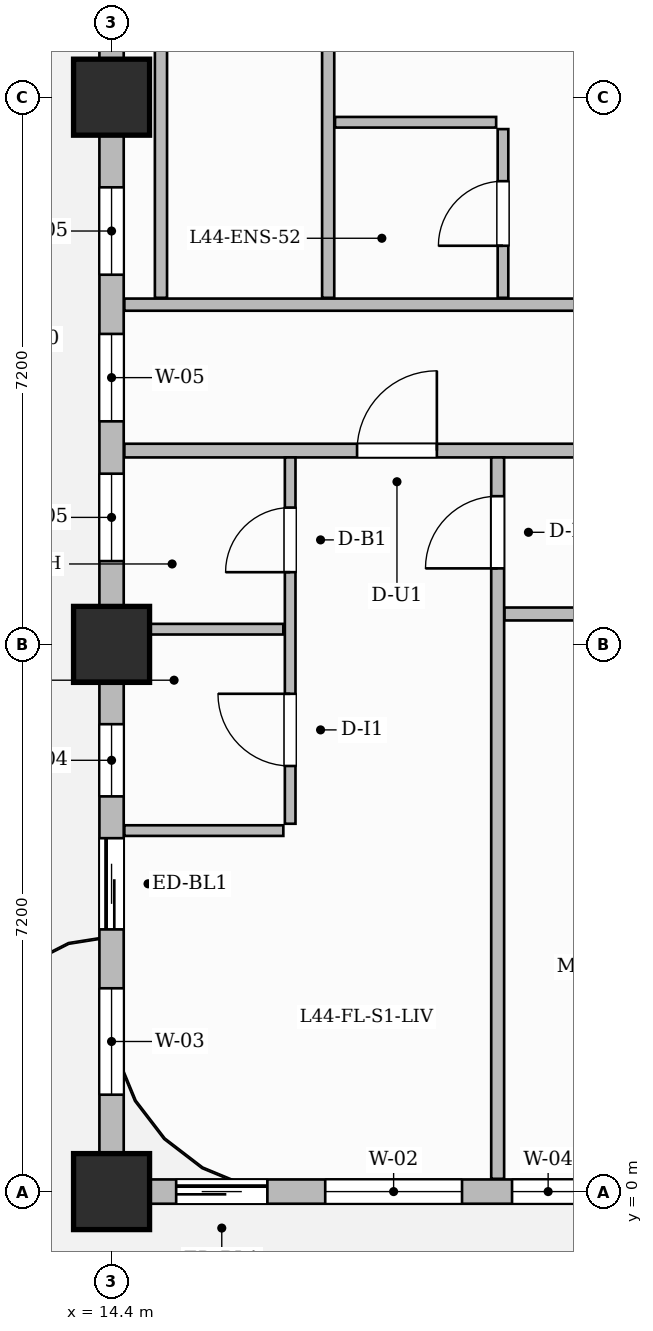
"""IFC4 building model, lengths in metres.
Left out: names, types, materials, properties, quantities, classifications, styles, units other than length and angle.
Written with IfcOpenShell. Run it as: python <this file> out.ifc"""

import sys

from ifc_helpers import new_model, si_unit, direction, frame, frame_2d, origin, origin_2d, place, context, subcontext, project, spatial, rectangle, extrude, source, transform, mapped, element, fill, save


model = new_model("IFC4")
c1 = context("Model", 3, precision=1e-05, world=origin(), true_north=direction((0.0, 1.0)))
c2 = subcontext(c1, "Body", "Model", "MODEL_VIEW")
j1 = project(units=[si_unit("LENGTHUNIT", "METRE"), si_unit("PLANEANGLEUNIT", "RADIAN")], contexts=[c1])
p1 = place(None, origin())
s1 = spatial("IfcSite", under=j1, at=p1, CompositionType="ELEMENT")
p2 = place(p1, origin())
s2 = spatial("IfcBuilding", under=s1, at=p2, CompositionType="ELEMENT")
p3 = place(p2, frame((0.0, 0.0, 177.25)))
s3 = spatial("IfcBuildingStorey", under=s2, at=p3, CompositionType="ELEMENT", Elevation=177.25)
m1 = source(origin(), c2, "Body", "SweptSolid", [
    extrude(rectangle(XDim=1.0, YDim=1.0, at=origin_2d()), origin(), (0.0, 0.0, 1.0), 3.85),
])
for number, where, z_axis, x_axis in (
    (1, (14.4, 0.0, 0.0), (0.0, 0.0, 1.0), (1.0, 0.0, 0.0)),
    (2, (14.4, 7.2, 0.0), (0.0, 0.0, 1.0), (1.0, 0.0, 0.0)),
    (3, (14.4, 14.4, 0.0), (0.0, 0.0, 1.0), (1.0, 0.0, 0.0)),
):
    element("IfcColumn", number, at=place(p3, frame(where, z_axis=z_axis, x_axis=x_axis)), inside=s3, PredefinedType="COLUMN", context=c2, shape_type="MappedRepresentation", body=[
        mapped(m1, transform((0.0, 0.0, 0.0), scale=1.0)),
    ])
p4 = place(p3, frame((14.568, 9.75, 0.0), z_axis=(0.0, 0.0, 1.0), x_axis=(1.0, 0.0, 0.0)))
e4 = element("IfcWall", 4, at=p4, inside=s3, PredefinedType="PARTITIONING", context=c2, shape_type="SweptSolid", body=[
    extrude(rectangle(XDim=15.542, YDim=0.18, at=frame_2d((7.771, 0.0))), origin(), (0.0, 0.0, 1.0), 3.6),
])
p5 = place(p4, frame((3.062, 0.0, 0.0)))
e5 = element("IfcOpeningElement", 5, at=p5, cuts=e4, PredefinedType="OPENING", context=c2, shape_type="SweptSolid", body=[
    extrude(rectangle(XDim=1.05, YDim=2.25, at=frame_2d((0.525, 1.125))), frame((0.0, 0.1, 0.0), z_axis=(0.0, -1.0, 0.0), x_axis=(1.0, 0.0, 0.0)), (0.0, 0.0, 1.0), 0.2),
])
p6 = place(p3, frame((14.568, 11.67, 0.0), z_axis=(0.0, 0.0, 1.0), x_axis=(1.0, 0.0, 0.0)))
e6 = element("IfcWall", 6, at=p6, inside=s3, PredefinedType="PARTITIONING", context=c2, shape_type="SweptSolid", body=[
    extrude(rectangle(XDim=15.542, YDim=0.16, at=frame_2d((7.771, 0.0))), origin(), (0.0, 0.0, 1.0), 3.6),
])
p7 = place(p6, frame((6.682, 0.0, 0.0)))
e7 = element("IfcOpeningElement", 7, at=p7, cuts=e6, PredefinedType="OPENING", context=c2, shape_type="SweptSolid", body=[
    extrude(rectangle(XDim=1.05, YDim=2.25, at=frame_2d((0.525, 1.125))), frame((0.0, 0.09, 0.0), z_axis=(0.0, -1.0, 0.0), x_axis=(1.0, 0.0, 0.0)), (0.0, 0.0, 1.0), 0.18),
])
p8 = place(p6, frame((11.832, 0.0, 0.0)))
e8 = element("IfcOpeningElement", 8, at=p8, cuts=e6, PredefinedType="OPENING", context=c2, shape_type="SweptSolid", body=[
    extrude(rectangle(XDim=1.4, YDim=2.35, at=frame_2d((0.7, 1.175))), frame((0.0, 0.09, 0.0), z_axis=(0.0, -1.0, 0.0), x_axis=(1.0, 0.0, 0.0)), (0.0, 0.0, 1.0), 0.18),
])
p9 = place(p3, frame((16.75, 4.84, 0.0), z_axis=(0.0, 0.0, 1.0), x_axis=(0.0, 1.0, 0.0)))
e9 = element("IfcWall", 9, at=p9, inside=s3, PredefinedType="PARTITIONING", context=c2, shape_type="SweptSolid", body=[
    extrude(rectangle(XDim=4.82, YDim=0.14, at=frame_2d((2.41, 0.0))), origin(), (0.0, 0.0, 1.0), 3.6),
])
p10 = place(p9, frame((0.76, 0.0, 0.0)))
e10 = element("IfcOpeningElement", 10, at=p10, cuts=e9, PredefinedType="OPENING", context=c2, shape_type="SweptSolid", body=[
    extrude(rectangle(XDim=0.95, YDim=2.15, at=frame_2d((0.475, 1.075))), frame((0.0, 0.08, 0.0), z_axis=(0.0, -1.0, 0.0), x_axis=(1.0, 0.0, 0.0)), (0.0, 0.0, 1.0), 0.16),
])
p11 = place(p9, frame((3.31, 0.0, 0.0)))
e11 = element("IfcOpeningElement", 11, at=p11, cuts=e9, PredefinedType="OPENING", context=c2, shape_type="SweptSolid", body=[
    extrude(rectangle(XDim=0.85, YDim=2.1, at=frame_2d((0.425, 1.05))), frame((0.0, 0.08, 0.0), z_axis=(0.0, -1.0, 0.0), x_axis=(1.0, 0.0, 0.0)), (0.0, 0.0, 1.0), 0.16),
])
p12 = place(p3, frame((14.59, 7.4, 0.0), z_axis=(0.0, 0.0, 1.0), x_axis=(1.0, 0.0, 0.0)))
e12 = element("IfcWall", 12, at=p12, inside=s3, PredefinedType="PARTITIONING", context=c2, shape_type="SweptSolid", body=[
    extrude(rectangle(XDim=2.07, YDim=0.14, at=frame_2d((1.035, 0.0))), origin(), (0.0, 0.0, 1.0), 3.085),
])
p13 = place(p3, frame((14.568, 4.75, 0.0), z_axis=(0.0, 0.0, 1.0), x_axis=(1.0, 0.0, 0.0)))
e13 = element("IfcWall", 13, at=p13, inside=s3, PredefinedType="PARTITIONING", context=c2, shape_type="SweptSolid", body=[
    extrude(rectangle(XDim=2.092, YDim=0.14, at=frame_2d((1.046, 0.0))), origin(), (0.0, 0.0, 1.0), 3.6),
])
p14 = place(p3, frame((19.48, 0.168, 0.0), z_axis=(0.0, 0.0, 1.0), x_axis=(0.0, 1.0, 0.0)))
e14 = element("IfcWall", 14, at=p14, inside=s3, PredefinedType="PARTITIONING", context=c2, shape_type="SweptSolid", body=[
    extrude(rectangle(XDim=9.492, YDim=0.17, at=frame_2d((4.746, 0.0))), origin(), (0.0, 0.0, 1.0), 3.6),
])
p15 = place(p14, frame((8.032, 0.0, 0.0)))
e15 = element("IfcOpeningElement", 15, at=p15, cuts=e14, PredefinedType="OPENING", context=c2, shape_type="SweptSolid", body=[
    extrude(rectangle(XDim=0.95, YDim=2.15, at=frame_2d((0.475, 1.075))), frame((0.0, 0.095, 0.0), z_axis=(0.0, -1.0, 0.0), x_axis=(1.0, 0.0, 0.0)), (0.0, 0.0, 1.0), 0.19),
])
p16 = place(p3, frame((19.57, 7.6, 0.0), z_axis=(0.0, 0.0, 1.0), x_axis=(1.0, 0.0, 0.0)))
e16 = element("IfcWall", 16, at=p16, inside=s3, PredefinedType="PARTITIONING", context=c2, shape_type="SweptSolid", body=[
    extrude(rectangle(XDim=10.54, YDim=0.17, at=frame_2d((5.27, 0.0))), origin(), (0.0, 0.0, 1.0), 3.6),
])
p17 = place(p16, frame((2.784, 0.0, 0.0)))
e17 = element("IfcOpeningElement", 17, at=p17, cuts=e16, PredefinedType="OPENING", context=c2, shape_type="SweptSolid", body=[
    extrude(rectangle(XDim=0.95, YDim=2.15, at=frame_2d((0.475, 1.075))), frame((0.0, 0.095, 0.0), z_axis=(0.0, -1.0, 0.0), x_axis=(1.0, 0.0, 0.0)), (0.0, 0.0, 1.0), 0.19),
])
p18 = place(p16, frame((4.865, 0.0, 0.0)))
e18 = element("IfcOpeningElement", 18, at=p18, cuts=e16, PredefinedType="OPENING", context=c2, shape_type="SweptSolid", body=[
    extrude(rectangle(XDim=0.95, YDim=2.15, at=frame_2d((0.475, 1.075))), frame((0.0, 0.095, 0.0), z_axis=(0.0, -1.0, 0.0), x_axis=(1.0, 0.0, 0.0)), (0.0, 0.0, 1.0), 0.19),
])
p19 = place(p16, frame((7.055, 0.0, 0.0)))
e19 = element("IfcOpeningElement", 19, at=p19, cuts=e16, PredefinedType="OPENING", context=c2, shape_type="SweptSolid", body=[
    extrude(rectangle(XDim=0.95, YDim=2.15, at=frame_2d((0.475, 1.075))), frame((0.0, 0.095, 0.0), z_axis=(0.0, -1.0, 0.0), x_axis=(1.0, 0.0, 0.0)), (0.0, 0.0, 1.0), 0.19),
])
for number, where, z_axis, x_axis in (
    (20, (15.05, 11.76, 0.0), (0.0, 0.0, 1.0), (0.0, 1.0, 0.0)),
    (21, (17.25, 11.76, 0.0), (0.0, 0.0, 1.0), (0.0, 1.0, 0.0)),
):
    element("IfcWall", number, at=place(p3, frame(where, z_axis=z_axis, x_axis=x_axis)), inside=s3, PredefinedType="PARTITIONING", context=c2, shape_type="SweptSolid", body=[
        extrude(rectangle(XDim=13.35, YDim=0.16, at=frame_2d((6.675, 0.0))), origin(), (0.0, 0.0, 1.0), 3.6),
    ])
p20 = place(p3, frame((19.55, 11.76, 0.0), z_axis=(0.0, 0.0, 1.0), x_axis=(0.0, 1.0, 0.0)))
e22 = element("IfcWall", 22, at=p20, inside=s3, PredefinedType="PARTITIONING", context=c2, shape_type="SweptSolid", body=[
    extrude(rectangle(XDim=2.22, YDim=0.14, at=frame_2d((1.11, 0.0))), origin(), (0.0, 0.0, 1.0), 3.6),
])
p21 = place(p20, frame((0.685, 0.0, 0.0)))
e23 = element("IfcOpeningElement", 23, at=p21, cuts=e22, PredefinedType="OPENING", context=c2, shape_type="SweptSolid", body=[
    extrude(rectangle(XDim=0.85, YDim=2.1, at=frame_2d((0.425, 1.05))), frame((0.0, 0.08, 0.0), z_axis=(0.0, -1.0, 0.0), x_axis=(1.0, 0.0, 0.0)), (0.0, 0.0, 1.0), 0.16),
])
p22 = place(p3, frame((17.34, 14.07, 0.0), z_axis=(0.0, 0.0, 1.0), x_axis=(1.0, 0.0, 0.0)))
e24 = element("IfcWall", 24, at=p22, inside=s3, PredefinedType="PARTITIONING", context=c2, shape_type="SweptSolid", body=[
    extrude(rectangle(XDim=2.12, YDim=0.14, at=frame_2d((1.06, 0.0))), origin(), (0.0, 0.0, 1.0), 3.6),
])
p23 = place(p3, frame((14.4, 0.0, 0.0), z_axis=(0.0, 0.0, 1.0), x_axis=(1.0, 0.0, 0.0)))
e25 = element("IfcWall", 25, at=p23, inside=s3, PredefinedType="SOLIDWALL", context=c2, shape_type="SweptSolid", body=[
    extrude(rectangle(XDim=35.4, YDim=0.32, at=frame_2d((17.7, 0.0))), origin(), (0.0, 0.0, 1.0), 3.085),
])
p24 = place(p23, frame((0.85, 0.0, 0.0)))
e26 = element("IfcOpeningElement", 26, at=p24, cuts=e25, PredefinedType="OPENING", context=c2, shape_type="SweptSolid", body=[
    extrude(rectangle(XDim=1.2, YDim=2.2, at=frame_2d((0.6, 1.1))), frame((0.0, 0.17, 0.0), z_axis=(0.0, -1.0, 0.0), x_axis=(1.0, 0.0, 0.0)), (0.0, 0.0, 1.0), 0.34),
])
p25 = place(p23, frame((2.811, 0.0, 0.8)))
e27 = element("IfcOpeningElement", 27, at=p25, cuts=e25, PredefinedType="OPENING", context=c2, shape_type="SweptSolid", body=[
    extrude(rectangle(XDim=1.8, YDim=1.85, at=frame_2d((0.9, 0.925))), frame((0.0, 0.17, 0.0), z_axis=(0.0, -1.0, 0.0), x_axis=(1.0, 0.0, 0.0)), (0.0, 0.0, 1.0), 0.34),
])
p26 = place(p23, frame((5.269, 0.0, 0.8)))
e28 = element("IfcOpeningElement", 28, at=p26, cuts=e25, PredefinedType="OPENING", context=c2, shape_type="SweptSolid", body=[
    extrude(rectangle(XDim=0.95, YDim=1.75, at=frame_2d((0.475, 0.875))), frame((0.0, 0.17, 0.0), z_axis=(0.0, -1.0, 0.0), x_axis=(1.0, 0.0, 0.0)), (0.0, 0.0, 1.0), 0.34),
])
p27 = place(p23, frame((8.181, 0.0, 0.8)))
e29 = element("IfcOpeningElement", 29, at=p27, cuts=e25, PredefinedType="OPENING", context=c2, shape_type="SweptSolid", body=[
    extrude(rectangle(XDim=0.95, YDim=1.75, at=frame_2d((0.475, 0.875))), frame((0.0, 0.17, 0.0), z_axis=(0.0, -1.0, 0.0), x_axis=(1.0, 0.0, 0.0)), (0.0, 0.0, 1.0), 0.34),
])
p28 = place(p23, frame((9.81, 0.0, 0.8)))
e30 = element("IfcOpeningElement", 30, at=p28, cuts=e25, PredefinedType="OPENING", context=c2, shape_type="SweptSolid", body=[
    extrude(rectangle(XDim=1.4, YDim=1.85, at=frame_2d((0.7, 0.925))), frame((0.0, 0.17, 0.0), z_axis=(0.0, -1.0, 0.0), x_axis=(1.0, 0.0, 0.0)), (0.0, 0.0, 1.0), 0.34),
])
p29 = place(p23, frame((12.079, 0.0, 0.8)))
e31 = element("IfcOpeningElement", 31, at=p29, cuts=e25, PredefinedType="OPENING", context=c2, shape_type="SweptSolid", body=[
    extrude(rectangle(XDim=1.15, YDim=1.8, at=frame_2d((0.575, 0.9))), frame((0.0, 0.17, 0.0), z_axis=(0.0, -1.0, 0.0), x_axis=(1.0, 0.0, 0.0)), (0.0, 0.0, 1.0), 0.34),
])
p30 = place(p23, frame((16.804, 0.0, 0.8)))
e32 = element("IfcOpeningElement", 32, at=p30, cuts=e25, PredefinedType="OPENING", context=c2, shape_type="SweptSolid", body=[
    extrude(rectangle(XDim=1.8, YDim=1.85, at=frame_2d((0.9, 0.925))), frame((0.0, 0.17, 0.0), z_axis=(0.0, -1.0, 0.0), x_axis=(1.0, 0.0, 0.0)), (0.0, 0.0, 1.0), 0.34),
])
p31 = place(p23, frame((21.725, 0.0, 0.8)))
e33 = element("IfcOpeningElement", 33, at=p31, cuts=e25, PredefinedType="OPENING", context=c2, shape_type="SweptSolid", body=[
    extrude(rectangle(XDim=1.8, YDim=1.85, at=frame_2d((0.9, 0.925))), frame((0.0, 0.17, 0.0), z_axis=(0.0, -1.0, 0.0), x_axis=(1.0, 0.0, 0.0)), (0.0, 0.0, 1.0), 0.34),
])
p32 = place(p23, frame((24.475, 0.0, 0.8)))
e34 = element("IfcOpeningElement", 34, at=p32, cuts=e25, PredefinedType="OPENING", context=c2, shape_type="SweptSolid", body=[
    extrude(rectangle(XDim=1.8, YDim=1.85, at=frame_2d((0.9, 0.925))), frame((0.0, 0.17, 0.0), z_axis=(0.0, -1.0, 0.0), x_axis=(1.0, 0.0, 0.0)), (0.0, 0.0, 1.0), 0.34),
])
p33 = place(p23, frame((29.075, 0.0, 0.8)))
e35 = element("IfcOpeningElement", 35, at=p33, cuts=e25, PredefinedType="OPENING", context=c2, shape_type="SweptSolid", body=[
    extrude(rectangle(XDim=1.8, YDim=1.85, at=frame_2d((0.9, 0.925))), frame((0.0, 0.17, 0.0), z_axis=(0.0, -1.0, 0.0), x_axis=(1.0, 0.0, 0.0)), (0.0, 0.0, 1.0), 0.34),
])
p34 = place(p23, frame((32.125, 0.0, 0.8)))
e36 = element("IfcOpeningElement", 36, at=p34, cuts=e25, PredefinedType="OPENING", context=c2, shape_type="SweptSolid", body=[
    extrude(rectangle(XDim=1.8, YDim=1.85, at=frame_2d((0.9, 0.925))), frame((0.0, 0.17, 0.0), z_axis=(0.0, -1.0, 0.0), x_axis=(1.0, 0.0, 0.0)), (0.0, 0.0, 1.0), 0.34),
])
p35 = place(p3, frame((14.4, 0.05, 0.0), z_axis=(0.0, 0.0, 1.0), x_axis=(0.0, 1.0, 0.0)))
e37 = element("IfcWall", 37, at=p35, inside=s3, PredefinedType="SOLIDWALL", context=c2, shape_type="SweptSolid", body=[
    extrude(rectangle(XDim=20.6, YDim=0.32, at=frame_2d((10.3, 0.0))), origin(), (0.0, 0.0, 1.0), 3.085),
])
p36 = place(p35, frame((3.4, 0.0, 0.0)))
e38 = element("IfcOpeningElement", 38, at=p36, cuts=e37, PredefinedType="OPENING", context=c2, shape_type="SweptSolid", body=[
    extrude(rectangle(XDim=1.2, YDim=2.2, at=frame_2d((0.6, 1.1))), frame((0.0, 0.17, 0.0), z_axis=(0.0, -1.0, 0.0), x_axis=(1.0, 0.0, 0.0)), (0.0, 0.0, 1.0), 0.34),
])
p37 = place(p35, frame((1.225, 0.0, 0.8)))
e39 = element("IfcOpeningElement", 39, at=p37, cuts=e37, PredefinedType="OPENING", context=c2, shape_type="SweptSolid", body=[
    extrude(rectangle(XDim=1.4, YDim=1.85, at=frame_2d((0.7, 0.925))), frame((0.0, 0.17, 0.0), z_axis=(0.0, -1.0, 0.0), x_axis=(1.0, 0.0, 0.0)), (0.0, 0.0, 1.0), 0.34),
])
p38 = place(p35, frame((5.15, 0.0, 0.8)))
e40 = element("IfcOpeningElement", 40, at=p38, cuts=e37, PredefinedType="OPENING", context=c2, shape_type="SweptSolid", body=[
    extrude(rectangle(XDim=0.95, YDim=1.75, at=frame_2d((0.475, 0.875))), frame((0.0, 0.17, 0.0), z_axis=(0.0, -1.0, 0.0), x_axis=(1.0, 0.0, 0.0)), (0.0, 0.0, 1.0), 0.34),
])
p39 = place(p35, frame((8.246, 0.0, 0.8)))
e41 = element("IfcOpeningElement", 41, at=p39, cuts=e37, PredefinedType="OPENING", context=c2, shape_type="SweptSolid", body=[
    extrude(rectangle(XDim=1.15, YDim=1.8, at=frame_2d((0.575, 0.9))), frame((0.0, 0.17, 0.0), z_axis=(0.0, -1.0, 0.0), x_axis=(1.0, 0.0, 0.0)), (0.0, 0.0, 1.0), 0.34),
])
p40 = place(p35, frame((10.085, 0.0, 0.8)))
e42 = element("IfcOpeningElement", 42, at=p40, cuts=e37, PredefinedType="OPENING", context=c2, shape_type="SweptSolid", body=[
    extrude(rectangle(XDim=1.15, YDim=1.8, at=frame_2d((0.575, 0.9))), frame((0.0, 0.17, 0.0), z_axis=(0.0, -1.0, 0.0), x_axis=(1.0, 0.0, 0.0)), (0.0, 0.0, 1.0), 0.34),
])
p41 = place(p35, frame((12.014, 0.0, 0.8)))
e43 = element("IfcOpeningElement", 43, at=p41, cuts=e37, PredefinedType="OPENING", context=c2, shape_type="SweptSolid", body=[
    extrude(rectangle(XDim=1.15, YDim=1.8, at=frame_2d((0.575, 0.9))), frame((0.0, 0.17, 0.0), z_axis=(0.0, -1.0, 0.0), x_axis=(1.0, 0.0, 0.0)), (0.0, 0.0, 1.0), 0.34),
])
p42 = place(p35, frame((16.79, 0.0, 0.8)))
e44 = element("IfcOpeningElement", 44, at=p42, cuts=e37, PredefinedType="OPENING", context=c2, shape_type="SweptSolid", body=[
    extrude(rectangle(XDim=1.8, YDim=1.85, at=frame_2d((0.9, 0.925))), frame((0.0, 0.17, 0.0), z_axis=(0.0, -1.0, 0.0), x_axis=(1.0, 0.0, 0.0)), (0.0, 0.0, 1.0), 0.34),
])
m2 = source(origin(), c2, "Body", "SweptSolid", [
    extrude(rectangle(XDim=0.95, YDim=2.15, at=frame_2d((0.475, 1.075))), frame((0.0, 0.025, 0.0), z_axis=(0.0, -1.0, 0.0), x_axis=(1.0, 0.0, 0.0)), (0.0, 0.0, 1.0), 0.05),
])
p43 = place(p10, origin())
e45 = element("IfcDoor", 45, at=p43, inside=s3, OperationType="SINGLE_SWING_RIGHT", PredefinedType="DOOR", context=c2, shape_type="MappedRepresentation", body=[
    mapped(m2, transform((0.0, 0.0, 0.0), scale=1.0)),
])
fill(e10, e45)
m3 = source(origin(), c2, "Body", "SweptSolid", [
    extrude(rectangle(XDim=0.85, YDim=2.1, at=frame_2d((0.425, 1.05))), frame((0.0, 0.025, 0.0), z_axis=(0.0, -1.0, 0.0), x_axis=(1.0, 0.0, 0.0)), (0.0, 0.0, 1.0), 0.05),
])
p44 = place(p11, origin())
e46 = element("IfcDoor", 46, at=p44, inside=s3, OperationType="SINGLE_SWING_LEFT", PredefinedType="DOOR", context=c2, shape_type="MappedRepresentation", body=[
    mapped(m3, transform((0.0, 0.0, 0.0), scale=1.0)),
])
fill(e11, e46)
m4 = source(origin(), c2, "Body", "SweptSolid", [
    extrude(rectangle(XDim=1.05, YDim=2.25, at=frame_2d((0.525, 1.125))), frame((0.0, 0.025, 0.0), z_axis=(0.0, -1.0, 0.0), x_axis=(1.0, 0.0, 0.0)), (0.0, 0.0, 1.0), 0.05),
])
p45 = place(p5, origin())
e47 = element("IfcDoor", 47, at=p45, inside=s3, OperationType="SINGLE_SWING_RIGHT", PredefinedType="DOOR", context=c2, shape_type="MappedRepresentation", body=[
    mapped(m4, transform((0.0, 0.0, 0.0), scale=1.0)),
])
fill(e5, e47)
p46 = place(p15, origin())
e48 = element("IfcDoor", 48, at=p46, inside=s3, OperationType="SINGLE_SWING_LEFT", PredefinedType="DOOR", context=c2, shape_type="MappedRepresentation", body=[
    mapped(m2, transform((0.0, 0.0, 0.0), scale=1.0)),
])
fill(e15, e48)
p47 = place(p21, origin())
e49 = element("IfcDoor", 49, at=p47, inside=s3, OperationType="SINGLE_SWING_LEFT", PredefinedType="DOOR", context=c2, shape_type="MappedRepresentation", body=[
    mapped(m3, transform((0.0, 0.0, 0.0), scale=1.0)),
])
fill(e23, e49)
m5 = source(origin(), c2, "Body", "SweptSolid", [
    extrude(rectangle(XDim=1.2, YDim=2.2, at=frame_2d((0.6, 1.1))), frame((0.0, 0.025, 0.0), z_axis=(0.0, -1.0, 0.0), x_axis=(1.0, 0.0, 0.0)), (0.0, 0.0, 1.0), 0.05),
])
p48 = place(p24, origin())
e50 = element("IfcDoor", 50, at=p48, inside=s3, OperationType="SLIDING_TO_LEFT", PredefinedType="DOOR", context=c2, shape_type="MappedRepresentation", body=[
    mapped(m5, transform((0.0, 0.0, 0.0), scale=1.0)),
])
fill(e26, e50)
p49 = place(p36, origin())
e51 = element("IfcDoor", 51, at=p49, inside=s3, OperationType="SLIDING_TO_LEFT", PredefinedType="DOOR", context=c2, shape_type="MappedRepresentation", body=[
    mapped(m5, transform((0.0, 0.0, 0.0), scale=1.0)),
])
fill(e38, e51)
m6 = source(origin(), c2, "Body", "SweptSolid", [
    extrude(rectangle(XDim=1.8, YDim=1.85, at=frame_2d((0.9, 0.925))), frame((0.0, 0.03, 0.0), z_axis=(0.0, -1.0, 0.0), x_axis=(1.0, 0.0, 0.0)), (0.0, 0.0, 1.0), 0.06),
])
p50 = place(p25, origin())
e52 = element("IfcWindow", 52, at=p50, inside=s3, PartitioningType="DOUBLE_PANEL_VERTICAL", PredefinedType="WINDOW", context=c2, shape_type="MappedRepresentation", body=[
    mapped(m6, transform((0.0, 0.0, 0.0), scale=1.0)),
])
fill(e27, e52)
m7 = source(origin(), c2, "Body", "SweptSolid", [
    extrude(rectangle(XDim=0.95, YDim=1.75, at=frame_2d((0.475, 0.875))), frame((0.0, 0.03, 0.0), z_axis=(0.0, -1.0, 0.0), x_axis=(1.0, 0.0, 0.0)), (0.0, 0.0, 1.0), 0.06),
])
p51 = place(p26, origin())
e53 = element("IfcWindow", 53, at=p51, inside=s3, PartitioningType="SINGLE_PANEL", PredefinedType="WINDOW", context=c2, shape_type="MappedRepresentation", body=[
    mapped(m7, transform((0.0, 0.0, 0.0), scale=1.0)),
])
fill(e28, e53)
m8 = source(origin(), c2, "Body", "SweptSolid", [
    extrude(rectangle(XDim=1.4, YDim=1.85, at=frame_2d((0.7, 0.925))), frame((0.0, 0.03, 0.0), z_axis=(0.0, -1.0, 0.0), x_axis=(1.0, 0.0, 0.0)), (0.0, 0.0, 1.0), 0.06),
])
p52 = place(p37, origin())
e54 = element("IfcWindow", 54, at=p52, inside=s3, PartitioningType="SINGLE_PANEL", PredefinedType="WINDOW", context=c2, shape_type="MappedRepresentation", body=[
    mapped(m8, transform((0.0, 0.0, 0.0), scale=1.0)),
])
fill(e39, e54)
p53 = place(p38, origin())
e55 = element("IfcWindow", 55, at=p53, inside=s3, PartitioningType="SINGLE_PANEL", PredefinedType="WINDOW", context=c2, shape_type="MappedRepresentation", body=[
    mapped(m7, transform((0.0, 0.0, 0.0), scale=1.0)),
])
fill(e40, e55)
m9 = source(origin(), c2, "Body", "SweptSolid", [
    extrude(rectangle(XDim=1.15, YDim=1.8, at=frame_2d((0.575, 0.9))), frame((0.0, 0.03, 0.0), z_axis=(0.0, -1.0, 0.0), x_axis=(1.0, 0.0, 0.0)), (0.0, 0.0, 1.0), 0.06),
])
p54 = place(p39, origin())
e56 = element("IfcWindow", 56, at=p54, inside=s3, PartitioningType="SINGLE_PANEL", PredefinedType="WINDOW", context=c2, shape_type="MappedRepresentation", body=[
    mapped(m9, transform((0.0, 0.0, 0.0), scale=1.0)),
])
fill(e41, e56)
p55 = place(p40, origin())
e57 = element("IfcWindow", 57, at=p55, inside=s3, PartitioningType="SINGLE_PANEL", PredefinedType="WINDOW", context=c2, shape_type="MappedRepresentation", body=[
    mapped(m9, transform((0.0, 0.0, 0.0), scale=1.0)),
])
fill(e42, e57)
p56 = place(p41, origin())
e58 = element("IfcWindow", 58, at=p56, inside=s3, PartitioningType="SINGLE_PANEL", PredefinedType="WINDOW", context=c2, shape_type="MappedRepresentation", body=[
    mapped(m9, transform((0.0, 0.0, 0.0), scale=1.0)),
])
fill(e43, e58)
save(model, sys.argv[1])
